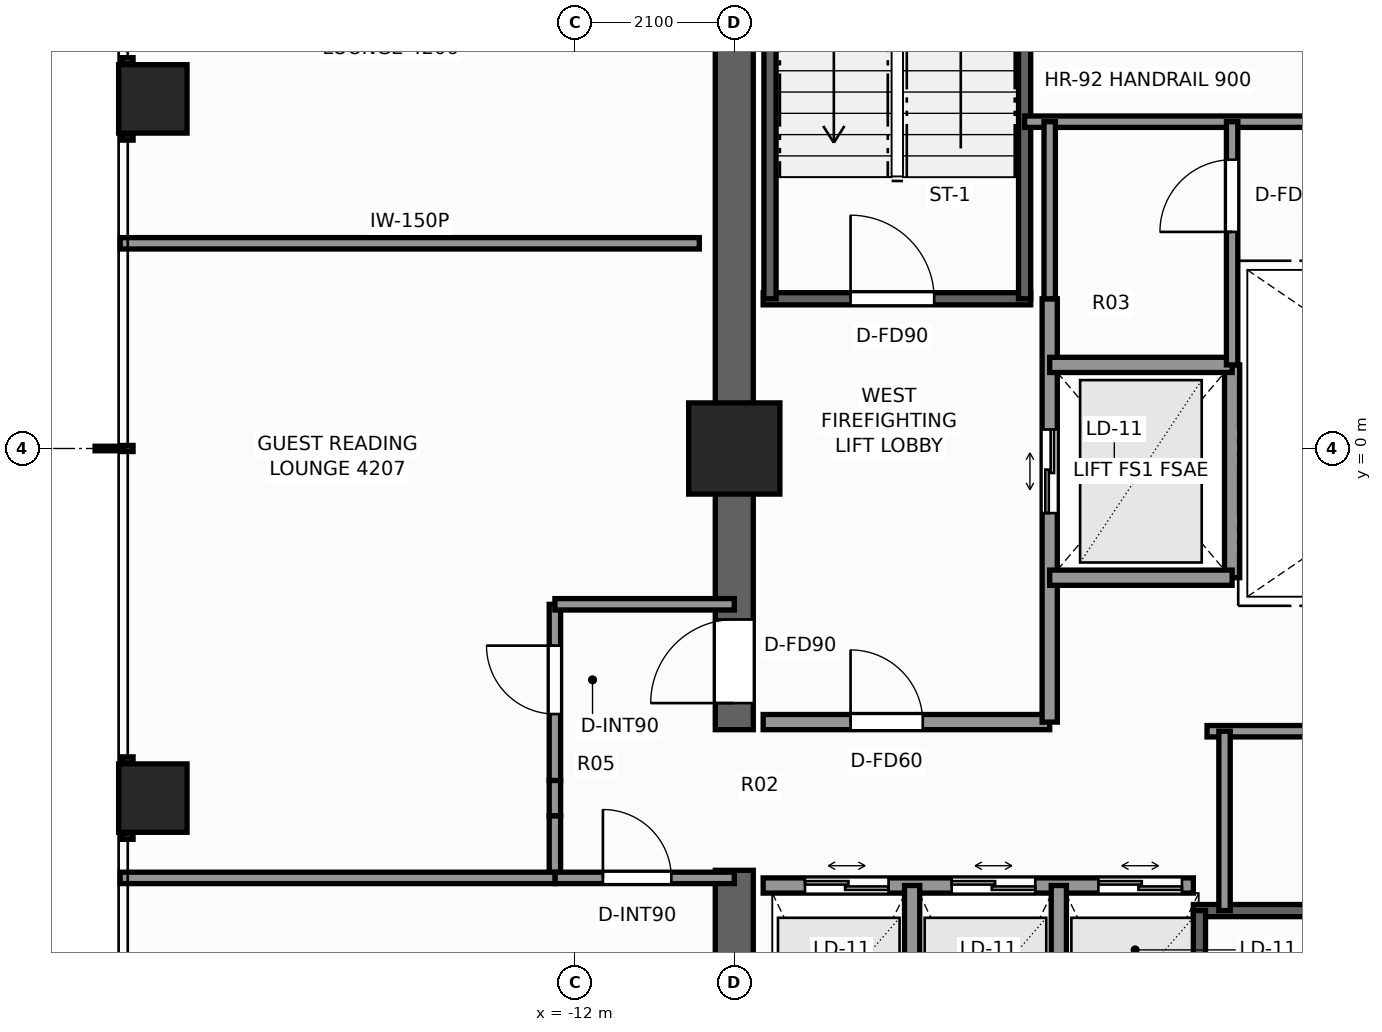
"""IFC4 building model, lengths in metres.
Left out: names, types, materials, properties, quantities, classifications, styles, units other than length and angle.
Written with IfcOpenShell. Run it as: python <this file> out.ifc"""

import sys

from ifc_helpers import new_model, si_unit, direction, frame, frame_2d, origin, origin_2d, place, context, subcontext, project, spatial, rectangle, extrude, element, fill, save


model = new_model("IFC4")
c1 = context("Model", 3, precision=1e-05, world=origin(), true_north=direction((0.0, 1.0)))
c2 = subcontext(c1, "Body", "Model", "MODEL_VIEW")
j1 = project(units=[si_unit("LENGTHUNIT", "METRE"), si_unit("PLANEANGLEUNIT", "RADIAN")], contexts=[c1])
p1 = place(None, origin())
s1 = spatial("IfcSite", under=j1, at=p1, CompositionType="ELEMENT")
p2 = place(p1, origin())
s2 = spatial("IfcBuilding", under=s1, at=p2, CompositionType="ELEMENT")
p3 = place(p2, frame((0.0, 0.0, 144.8)))
s3 = spatial("IfcBuildingStorey", under=s2, at=p3, CompositionType="ELEMENT", Elevation=144.8)
p4 = place(p3, frame((-9.9, -9.65, 0.0), z_axis=(0.0, 0.0, 1.0), x_axis=(0.0, 1.0, 0.0)))
e1 = element("IfcWall", 1, at=p4, inside=s3, PredefinedType="SHEAR", context=c2, shape_type="SweptSolid", body=[
    extrude(rectangle(XDim=4.1, YDim=0.5, at=frame_2d((2.05, 0.0))), origin(), (0.0, 0.0, 1.0), 3.3),
])
p5 = place(p3, frame((-9.9, -3.7, 0.0), z_axis=(0.0, 0.0, 1.0), x_axis=(0.0, 1.0, 0.0)))
e2 = element("IfcWall", 2, at=p5, inside=s3, PredefinedType="SHEAR", context=c2, shape_type="SweptSolid", body=[
    extrude(rectangle(XDim=13.35, YDim=0.5, at=frame_2d((6.675, 0.0))), origin(), (0.0, 0.0, 1.0), 3.3),
])
p6 = place(p5, frame((0.35, 0.0, 0.0)))
e3 = element("IfcOpeningElement", 3, at=p6, cuts=e2, PredefinedType="OPENING", context=c2, shape_type="SweptSolid", body=[
    extrude(rectangle(XDim=1.1, YDim=2.2, at=frame_2d((0.55, 1.1))), frame((0.0, 0.26, 0.0), z_axis=(0.0, -1.0, 0.0), x_axis=(1.0, 0.0, 0.0)), (0.0, 0.0, 1.0), 0.52),
])
p7 = place(p3, frame((-9.9, 0.0, 0.0), z_axis=(0.0, 0.0, 1.0), x_axis=(1.0, 0.0, 0.0)))
e4 = element("IfcColumn", 4, at=p7, inside=s3, PredefinedType="COLUMN", context=c2, shape_type="SweptSolid", body=[
    extrude(rectangle(XDim=1.2, YDim=1.2, at=origin_2d()), origin(), (0.0, 0.0, 1.0), 3.3),
])
for number, where, z_axis, x_axis in (
    (5, (-17.55, -4.6, 0.0), (0.0, 0.0, 1.0), (1.0, 0.0, 0.0)),
    (6, (-17.55, 4.6, 0.0), (0.0, 0.0, 1.0), (1.0, 0.0, 0.0)),
):
    element("IfcColumn", number, at=place(p3, frame(where, z_axis=z_axis, x_axis=x_axis)), inside=s3, PredefinedType="COLUMN", context=c2, shape_type="SweptSolid", body=[
        extrude(rectangle(XDim=0.9, YDim=0.9, at=origin_2d()), origin(), (0.0, 0.0, 1.0), 3.3),
    ])
p8 = place(p3, frame((-9.52, 1.97, 0.0), z_axis=(0.0, 0.0, 1.0), x_axis=(1.0, 0.0, 0.0)))
e7 = element("IfcWall", 7, at=p8, inside=s3, PredefinedType="SHEAR", context=c2, shape_type="SweptSolid", body=[
    extrude(rectangle(XDim=3.52, YDim=0.16, at=frame_2d((1.76, 0.0))), origin(), (0.0, 0.0, 1.0), 3.3),
])
p9 = place(p8, frame((1.15, 0.0, 0.0)))
e8 = element("IfcOpeningElement", 8, at=p9, cuts=e7, PredefinedType="OPENING", context=c2, shape_type="SweptSolid", body=[
    extrude(rectangle(XDim=1.1, YDim=2.2, at=frame_2d((0.55, 1.1))), frame((0.0, 0.09, 0.0), z_axis=(0.0, -1.0, 0.0), x_axis=(1.0, 0.0, 0.0)), (0.0, 0.0, 1.0), 0.18),
])
for number, where, z_axis, x_axis in (
    (9, (-9.43, 1.97, 0.0), (0.0, 0.0, 1.0), (0.0, 1.0, 0.0)),
    (10, (-6.08, 1.97, 0.0), (0.0, 0.0, 1.0), (0.0, 1.0, 0.0)),
):
    element("IfcWall", number, at=place(p3, frame(where, z_axis=z_axis, x_axis=x_axis)), inside=s3, PredefinedType="SHEAR", context=c2, shape_type="SweptSolid", body=[
        extrude(rectangle(XDim=7.56, YDim=0.16, at=frame_2d((3.78, 0.0))), origin(), (0.0, 0.0, 1.0), 3.3),
    ])
p10 = place(p3, frame((-3.86, -6.08, 0.0), z_axis=(0.0, 0.0, 1.0), x_axis=(1.0, 0.0, 0.0)))
e11 = element("IfcWall", 11, at=p10, inside=s3, PredefinedType="SHEAR", context=c2, shape_type="SweptSolid", body=[
    extrude(rectangle(XDim=7.72, YDim=0.16, at=frame_2d((3.86, 0.0))), origin(), (0.0, 0.0, 1.0), 3.3),
])
p11 = place(p3, frame((-3.78, -9.43, 0.0), z_axis=(0.0, 0.0, 1.0), x_axis=(0.0, 1.0, 0.0)))
e12 = element("IfcWall", 12, at=p11, inside=s3, PredefinedType="SHEAR", context=c2, shape_type="SweptSolid", body=[
    extrude(rectangle(XDim=3.35, YDim=0.16, at=frame_2d((1.675, 0.0))), origin(), (0.0, 0.0, 1.0), 3.3),
])
p12 = place(p3, frame((-9.52, -3.6, 0.0), z_axis=(0.0, 0.0, 1.0), x_axis=(1.0, 0.0, 0.0)))
e13 = element("IfcWall", 13, at=p12, inside=s3, PredefinedType="SOLIDWALL", context=c2, shape_type="SweptSolid", body=[
    extrude(rectangle(XDim=3.77, YDim=0.2, at=frame_2d((1.885, 0.0))), origin(), (0.0, 0.0, 1.0), 2.95),
])
p13 = place(p12, frame((1.15, 0.0, 0.0)))
e14 = element("IfcOpeningElement", 14, at=p13, cuts=e13, PredefinedType="OPENING", context=c2, shape_type="SweptSolid", body=[
    extrude(rectangle(XDim=0.95, YDim=2.06, at=frame_2d((0.475, 1.03))), frame((0.0, 0.11, 0.0), z_axis=(0.0, -1.0, 0.0), x_axis=(1.0, 0.0, 0.0)), (0.0, 0.0, 1.0), 0.22),
])
p14 = place(p3, frame((-5.75, -3.6, 0.0), z_axis=(0.0, 0.0, 1.0), x_axis=(0.0, 1.0, 0.0)))
e15 = element("IfcWall", 15, at=p14, inside=s3, PredefinedType="SOLIDWALL", context=c2, shape_type="SweptSolid", body=[
    extrude(rectangle(XDim=5.57, YDim=0.2, at=frame_2d((2.785, 0.0))), origin(), (0.0, 0.0, 1.0), 2.585),
])
p15 = place(p14, frame((2.75, 0.0, 0.0)))
e16 = element("IfcOpeningElement", 16, at=p15, cuts=e15, PredefinedType="OPENING", context=c2, shape_type="SweptSolid", body=[
    extrude(rectangle(XDim=1.1, YDim=2.2, at=frame_2d((0.55, 1.1))), frame((0.0, 0.11, 0.0), z_axis=(0.0, -1.0, 0.0), x_axis=(1.0, 0.0, 0.0)), (0.0, 0.0, 1.0), 0.22),
])
p16 = place(p3, frame((-3.35, -1.7, 0.0), z_axis=(0.0, 0.0, 1.0), x_axis=(0.0, 1.0, 0.0)))
e17 = element("IfcWall", 17, at=p16, inside=s3, PredefinedType="SOLIDWALL", context=c2, shape_type="SweptSolid", body=[
    extrude(rectangle(XDim=2.8, YDim=0.2, at=frame_2d((1.4, 0.0))), origin(), (0.0, 0.0, 1.0), 2.585),
])
for number, where, z_axis, x_axis in (
    (18, (-5.75, -1.7, 0.0), (0.0, 0.0, 1.0), (1.0, 0.0, 0.0)),
    (19, (-5.75, 1.1, 0.0), (0.0, 0.0, 1.0), (1.0, 0.0, 0.0)),
):
    element("IfcWall", number, at=place(p3, frame(where, z_axis=z_axis, x_axis=x_axis)), inside=s3, PredefinedType="SOLIDWALL", context=c2, shape_type="SweptSolid", body=[
        extrude(rectangle(XDim=2.4, YDim=0.2, at=frame_2d((1.2, 0.0))), origin(), (0.0, 0.0, 1.0), 2.95),
    ])
p17 = place(p3, frame((-6.08, 4.3, 0.0), z_axis=(0.0, 0.0, 1.0), x_axis=(1.0, 0.0, 0.0)))
e20 = element("IfcWall", 20, at=p17, inside=s3, PredefinedType="PARTITIONING", context=c2, shape_type="SweptSolid", body=[
    extrude(rectangle(XDim=6.3, YDim=0.15, at=frame_2d((3.15, 0.0))), origin(), (0.0, 0.0, 1.0), 2.95),
])
p18 = place(p3, frame((-9.52, -5.75, 0.0), z_axis=(0.0, 0.0, 1.0), x_axis=(1.0, 0.0, 0.0)))
e21 = element("IfcWall", 21, at=p18, inside=s3, PredefinedType="SOLIDWALL", context=c2, shape_type="SweptSolid", body=[
    extrude(rectangle(XDim=5.66, YDim=0.2, at=frame_2d((2.83, 0.0))), origin(), (0.0, 0.0, 1.0), 2.95),
])
p19 = place(p18, frame((0.55, 0.0, 0.0)))
e22 = element("IfcOpeningElement", 22, at=p19, cuts=e21, PredefinedType="OPENING", context=c2, shape_type="SweptSolid", body=[
    extrude(rectangle(XDim=1.1, YDim=2.2, at=frame_2d((0.55, 1.1))), frame((0.0, 0.11, 0.0), z_axis=(0.0, -1.0, 0.0), x_axis=(1.0, 0.0, 0.0)), (0.0, 0.0, 1.0), 0.22),
])
p20 = place(p18, frame((2.48, 0.0, 0.0)))
e23 = element("IfcOpeningElement", 23, at=p20, cuts=e21, PredefinedType="OPENING", context=c2, shape_type="SweptSolid", body=[
    extrude(rectangle(XDim=1.1, YDim=2.2, at=frame_2d((0.55, 1.1))), frame((0.0, 0.11, 0.0), z_axis=(0.0, -1.0, 0.0), x_axis=(1.0, 0.0, 0.0)), (0.0, 0.0, 1.0), 0.22),
])
p21 = place(p18, frame((4.41, 0.0, 0.0)))
e24 = element("IfcOpeningElement", 24, at=p21, cuts=e21, PredefinedType="OPENING", context=c2, shape_type="SweptSolid", body=[
    extrude(rectangle(XDim=1.1, YDim=2.2, at=frame_2d((0.55, 1.1))), frame((0.0, 0.11, 0.0), z_axis=(0.0, -1.0, 0.0), x_axis=(1.0, 0.0, 0.0)), (0.0, 0.0, 1.0), 0.22),
])
for number, where, z_axis, x_axis in (
    (25, (-7.56, -9.52, 0.0), (0.0, 0.0, 1.0), (0.0, 1.0, 0.0)),
    (26, (-5.63, -9.52, 0.0), (0.0, 0.0, 1.0), (0.0, 1.0, 0.0)),
):
    element("IfcWall", number, at=place(p3, frame(where, z_axis=z_axis, x_axis=x_axis)), inside=s3, PredefinedType="SOLIDWALL", context=c2, shape_type="SweptSolid", body=[
        extrude(rectangle(XDim=3.77, YDim=0.2, at=frame_2d((1.885, 0.0))), origin(), (0.0, 0.0, 1.0), 2.95),
    ])
p22 = place(p3, frame((-3.68, -3.72, 0.0), z_axis=(0.0, 0.0, 1.0), x_axis=(1.0, 0.0, 0.0)))
e27 = element("IfcWall", 27, at=p22, inside=s3, PredefinedType="PARTITIONING", context=c2, shape_type="SweptSolid", body=[
    extrude(rectangle(XDim=7.36, YDim=0.15, at=frame_2d((3.68, 0.0))), origin(), (0.0, 0.0, 1.0), 2.95),
])
p23 = place(p3, frame((-3.45, -6.08, 0.0), z_axis=(0.0, 0.0, 1.0), x_axis=(0.0, 1.0, 0.0)))
e28 = element("IfcWall", 28, at=p23, inside=s3, PredefinedType="PARTITIONING", context=c2, shape_type="SweptSolid", body=[
    extrude(rectangle(XDim=2.36, YDim=0.15, at=frame_2d((1.18, 0.0))), origin(), (0.0, 0.0, 1.0), 2.95),
])
p24 = place(p3, frame((-3.35, 1.1, 0.0), z_axis=(0.0, 0.0, 1.0), x_axis=(0.0, 1.0, 0.0)))
e29 = element("IfcWall", 29, at=p24, inside=s3, PredefinedType="PARTITIONING", context=c2, shape_type="SweptSolid", body=[
    extrude(rectangle(XDim=3.2, YDim=0.15, at=frame_2d((1.6, 0.0))), origin(), (0.0, 0.0, 1.0), 2.585),
])
p25 = place(p24, frame((1.75, 0.0, 0.0)))
e30 = element("IfcOpeningElement", 30, at=p25, cuts=e29, PredefinedType="OPENING", context=c2, shape_type="SweptSolid", body=[
    extrude(rectangle(XDim=0.95, YDim=2.06, at=frame_2d((0.475, 1.03))), frame((0.0, 0.085, 0.0), z_axis=(0.0, -1.0, 0.0), x_axis=(1.0, 0.0, 0.0)), (0.0, 0.0, 1.0), 0.17),
])
p26 = place(p3, frame((-5.75, 1.97, 0.0), z_axis=(0.0, 0.0, 1.0), x_axis=(0.0, 1.0, 0.0)))
e31 = element("IfcWall", 31, at=p26, inside=s3, PredefinedType="PARTITIONING", context=c2, shape_type="SweptSolid", body=[
    extrude(rectangle(XDim=2.33, YDim=0.15, at=frame_2d((1.165, 0.0))), origin(), (0.0, 0.0, 1.0), 2.585),
])
p27 = place(p3, frame((-12.26, -5.65, 0.0), z_axis=(0.0, 0.0, 1.0), x_axis=(0.0, 1.0, 0.0)))
e32 = element("IfcWall", 32, at=p27, inside=s3, PredefinedType="PARTITIONING", context=c2, shape_type="SweptSolid", body=[
    extrude(rectangle(XDim=0.817, YDim=0.15, at=frame_2d((0.409, 0.0))), origin(), (0.0, 0.0, 1.0), 2.95),
])
p28 = place(p3, frame((-12.26, -4.833, 0.0), z_axis=(0.0, 0.0, 1.0), x_axis=(0.0, 1.0, 0.0)))
e33 = element("IfcWall", 33, at=p28, inside=s3, PredefinedType="PARTITIONING", context=c2, shape_type="SweptSolid", body=[
    extrude(rectangle(XDim=0.465, YDim=0.15, at=frame_2d((0.232, 0.0))), origin(), (0.0, 0.0, 1.0), 2.162),
])
p29 = place(p3, frame((-12.26, -4.367, 0.0), z_axis=(0.0, 0.0, 1.0), x_axis=(0.0, 1.0, 0.0)))
e34 = element("IfcWall", 34, at=p29, inside=s3, PredefinedType="PARTITIONING", context=c2, shape_type="SweptSolid", body=[
    extrude(rectangle(XDim=2.317, YDim=0.15, at=frame_2d((1.159, 0.0))), origin(), (0.0, 0.0, 1.0), 2.95),
])
p30 = place(p29, frame((0.874, 0.0, 0.0)))
e35 = element("IfcOpeningElement", 35, at=p30, cuts=e34, PredefinedType="OPENING", context=c2, shape_type="SweptSolid", body=[
    extrude(rectangle(XDim=0.9, YDim=2.06, at=frame_2d((0.45, 1.03))), frame((0.0, 0.085, 0.0), z_axis=(0.0, -1.0, 0.0), x_axis=(1.0, 0.0, 0.0)), (0.0, 0.0, 1.0), 0.17),
])
p31 = place(p3, frame((-12.26, -2.05, 0.0), z_axis=(0.0, 0.0, 1.0), x_axis=(1.0, 0.0, 0.0)))
e36 = element("IfcWall", 36, at=p31, inside=s3, PredefinedType="PARTITIONING", context=c2, shape_type="SweptSolid", body=[
    extrude(rectangle(XDim=2.36, YDim=0.15, at=frame_2d((1.18, 0.0))), origin(), (0.0, 0.0, 1.0), 2.95),
])
p32 = place(p3, frame((-12.26, -5.65, 0.0), z_axis=(0.0, 0.0, 1.0), x_axis=(1.0, 0.0, 0.0)))
e37 = element("IfcWall", 37, at=p32, inside=s3, PredefinedType="PARTITIONING", context=c2, shape_type="SweptSolid", body=[
    extrude(rectangle(XDim=2.36, YDim=0.15, at=frame_2d((1.18, 0.0))), origin(), (0.0, 0.0, 1.0), 2.95),
])
p33 = place(p32, frame((0.632, 0.0, 0.0)))
e38 = element("IfcOpeningElement", 38, at=p33, cuts=e37, PredefinedType="OPENING", context=c2, shape_type="SweptSolid", body=[
    extrude(rectangle(XDim=0.9, YDim=2.06, at=frame_2d((0.45, 1.03))), frame((0.0, 0.085, 0.0), z_axis=(0.0, -1.0, 0.0), x_axis=(1.0, 0.0, 0.0)), (0.0, 0.0, 1.0), 0.17),
])
p34 = place(p3, frame((-17.98, 2.7, 0.0), z_axis=(0.0, 0.0, 1.0), x_axis=(1.0, 0.0, 0.0)))
e39 = element("IfcWall", 39, at=p34, inside=s3, PredefinedType="PARTITIONING", context=c2, shape_type="SweptSolid", body=[
    extrude(rectangle(XDim=7.62, YDim=0.15, at=frame_2d((3.81, 0.0))), origin(), (0.0, 0.0, 1.0), 2.319),
])
p35 = place(p3, frame((-17.98, -5.65, 0.0), z_axis=(0.0, 0.0, 1.0), x_axis=(1.0, 0.0, 0.0)))
e40 = element("IfcWall", 40, at=p35, inside=s3, PredefinedType="PARTITIONING", context=c2, shape_type="SweptSolid", body=[
    extrude(rectangle(XDim=5.72, YDim=0.15, at=frame_2d((2.86, 0.0))), origin(), (0.0, 0.0, 1.0), 2.319),
])
p36 = place(p9, origin())
e41 = element("IfcDoor", 41, at=p36, inside=s3, OperationType="SINGLE_SWING_LEFT", PredefinedType="DOOR", context=c2, shape_type="SweptSolid", body=[
    extrude(rectangle(XDim=1.1, YDim=2.2, at=frame_2d((0.55, 1.1))), frame((0.0, 0.025, 0.0), z_axis=(0.0, -1.0, 0.0), x_axis=(1.0, 0.0, 0.0)), (0.0, 0.0, 1.0), 0.05),
])
fill(e8, e41)
p37 = place(p6, origin())
e42 = element("IfcDoor", 42, at=p37, inside=s3, OperationType="SINGLE_SWING_LEFT", PredefinedType="DOOR", context=c2, shape_type="SweptSolid", body=[
    extrude(rectangle(XDim=1.1, YDim=2.2, at=frame_2d((0.55, 1.1))), frame((0.0, 0.025, 0.0), z_axis=(0.0, -1.0, 0.0), x_axis=(1.0, 0.0, 0.0)), (0.0, 0.0, 1.0), 0.05),
])
fill(e3, e42)
p38 = place(p15, origin())
e43 = element("IfcDoor", 43, at=p38, inside=s3, OperationType="DOUBLE_DOOR_SLIDING", PredefinedType="DOOR", context=c2, shape_type="SweptSolid", body=[
    extrude(rectangle(XDim=1.1, YDim=2.2, at=frame_2d((0.55, 1.1))), frame((0.0, 0.025, 0.0), z_axis=(0.0, -1.0, 0.0), x_axis=(1.0, 0.0, 0.0)), (0.0, 0.0, 1.0), 0.05),
])
fill(e16, e43)
p39 = place(p19, origin())
e44 = element("IfcDoor", 44, at=p39, inside=s3, OperationType="DOUBLE_DOOR_SLIDING", PredefinedType="DOOR", context=c2, shape_type="SweptSolid", body=[
    extrude(rectangle(XDim=1.1, YDim=2.2, at=frame_2d((0.55, 1.1))), frame((0.0, 0.025, 0.0), z_axis=(0.0, -1.0, 0.0), x_axis=(1.0, 0.0, 0.0)), (0.0, 0.0, 1.0), 0.05),
])
fill(e22, e44)
p40 = place(p20, origin())
e45 = element("IfcDoor", 45, at=p40, inside=s3, OperationType="DOUBLE_DOOR_SLIDING", PredefinedType="DOOR", context=c2, shape_type="SweptSolid", body=[
    extrude(rectangle(XDim=1.1, YDim=2.2, at=frame_2d((0.55, 1.1))), frame((0.0, 0.025, 0.0), z_axis=(0.0, -1.0, 0.0), x_axis=(1.0, 0.0, 0.0)), (0.0, 0.0, 1.0), 0.05),
])
fill(e23, e45)
p41 = place(p21, origin())
e46 = element("IfcDoor", 46, at=p41, inside=s3, OperationType="DOUBLE_DOOR_SLIDING", PredefinedType="DOOR", context=c2, shape_type="SweptSolid", body=[
    extrude(rectangle(XDim=1.1, YDim=2.2, at=frame_2d((0.55, 1.1))), frame((0.0, 0.025, 0.0), z_axis=(0.0, -1.0, 0.0), x_axis=(1.0, 0.0, 0.0)), (0.0, 0.0, 1.0), 0.05),
])
fill(e24, e46)
p42 = place(p13, origin())
e47 = element("IfcDoor", 47, at=p42, inside=s3, OperationType="SINGLE_SWING_LEFT", PredefinedType="DOOR", context=c2, shape_type="SweptSolid", body=[
    extrude(rectangle(XDim=0.95, YDim=2.06, at=frame_2d((0.475, 1.03))), frame((0.0, 0.025, 0.0), z_axis=(0.0, -1.0, 0.0), x_axis=(1.0, 0.0, 0.0)), (0.0, 0.0, 1.0), 0.05),
])
fill(e14, e47)
p43 = place(p25, origin())
e48 = element("IfcDoor", 48, at=p43, inside=s3, OperationType="SINGLE_SWING_LEFT", PredefinedType="DOOR", context=c2, shape_type="SweptSolid", body=[
    extrude(rectangle(XDim=0.95, YDim=2.06, at=frame_2d((0.475, 1.03))), frame((0.0, 0.025, 0.0), z_axis=(0.0, -1.0, 0.0), x_axis=(1.0, 0.0, 0.0)), (0.0, 0.0, 1.0), 0.05),
])
fill(e30, e48)
p44 = place(p30, origin())
e49 = element("IfcDoor", 49, at=p44, inside=s3, OperationType="SINGLE_SWING_RIGHT", PredefinedType="DOOR", context=c2, shape_type="SweptSolid", body=[
    extrude(rectangle(XDim=0.9, YDim=2.06, at=frame_2d((0.45, 1.03))), frame((0.0, 0.025, 0.0), z_axis=(0.0, -1.0, 0.0), x_axis=(1.0, 0.0, 0.0)), (0.0, 0.0, 1.0), 0.05),
])
fill(e35, e49)
p45 = place(p33, origin())
e50 = element("IfcDoor", 50, at=p45, inside=s3, OperationType="SINGLE_SWING_LEFT", PredefinedType="DOOR", context=c2, shape_type="SweptSolid", body=[
    extrude(rectangle(XDim=0.9, YDim=2.06, at=frame_2d((0.45, 1.03))), frame((0.0, 0.025, 0.0), z_axis=(0.0, -1.0, 0.0), x_axis=(1.0, 0.0, 0.0)), (0.0, 0.0, 1.0), 0.05),
])
fill(e38, e50)
save(model, sys.argv[1])
